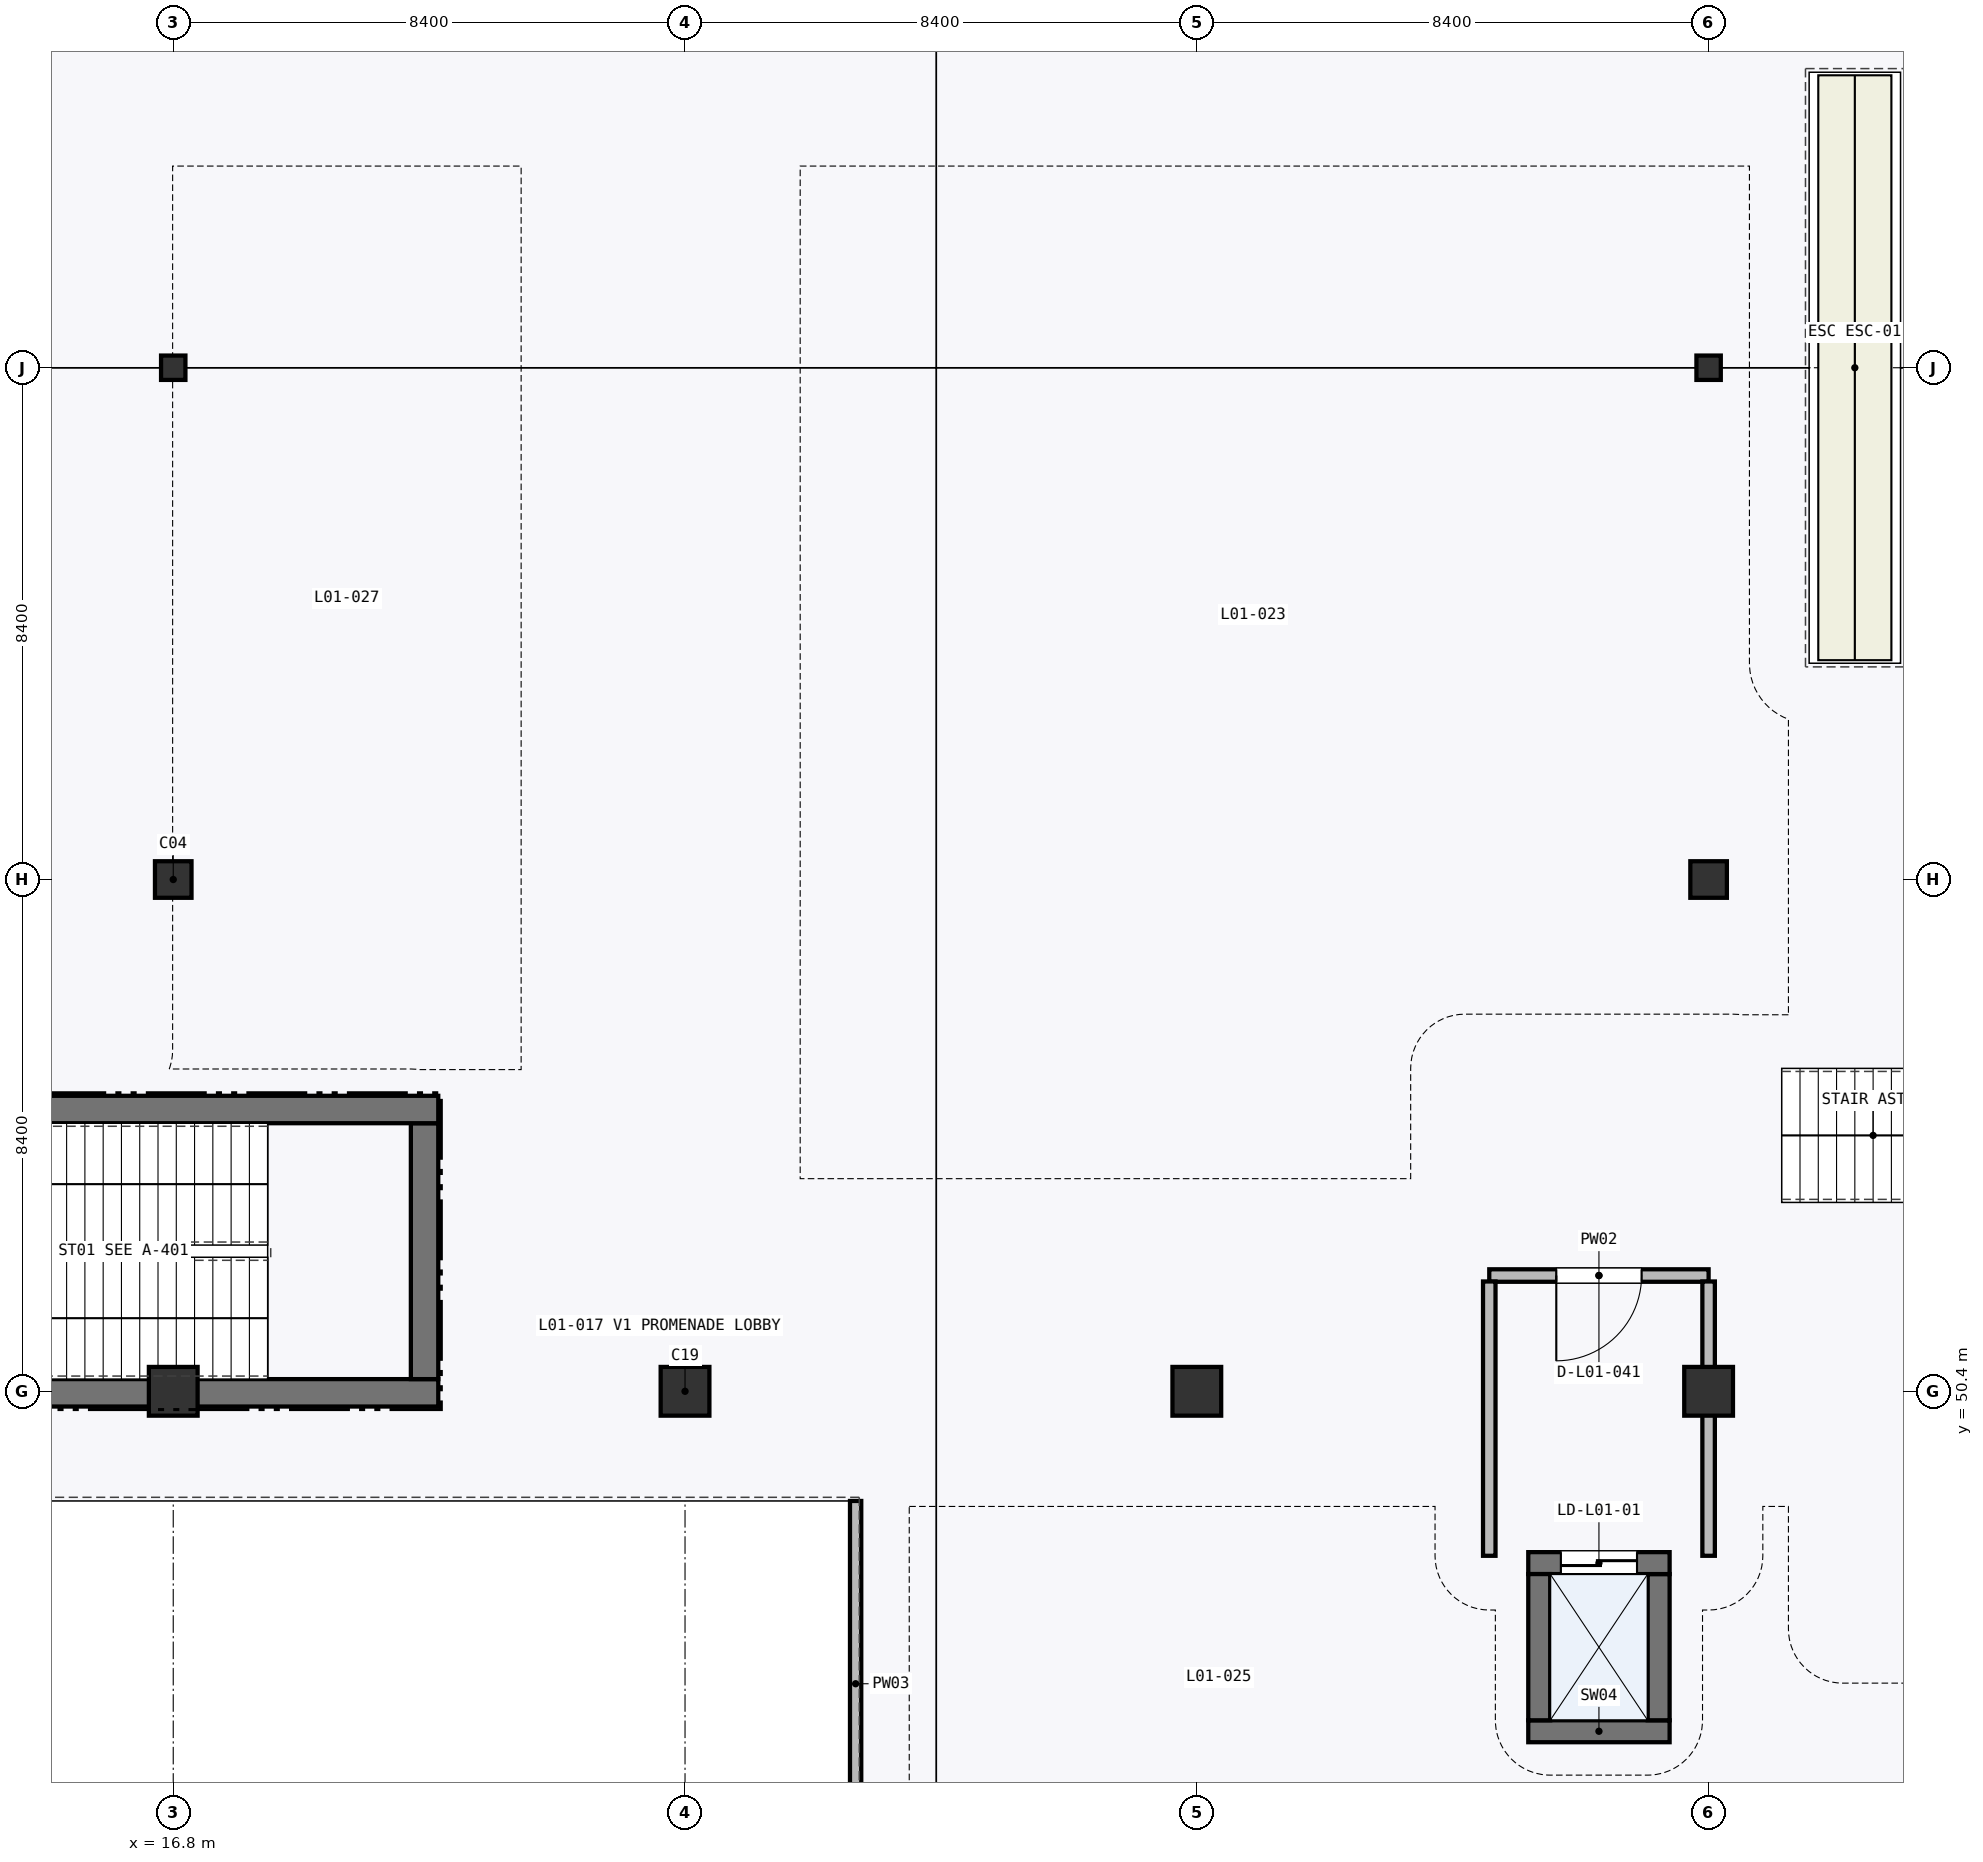
"""IFC4 building model, lengths in metres.
Left out: names, types, materials, properties, quantities, classifications, styles, units other than length and angle.
Written with IfcOpenShell. Run it as: python <this file> out.ifc"""

import sys

from ifc_helpers import new_model, si_unit, direction, frame, frame_2d, origin, origin_2d, place, context, subcontext, project, spatial, rectangle, hollow_rectangle, i_section, extrude, element, fill, save


model = new_model("IFC4")
c1 = context("Model", 3, precision=1e-05, world=origin(), true_north=direction((0.0, 1.0)))
c2 = subcontext(c1, "Body", "Model", "MODEL_VIEW")
j1 = project(units=[si_unit("LENGTHUNIT", "METRE"), si_unit("PLANEANGLEUNIT", "RADIAN")], contexts=[c1])
p1 = place(None, origin())
s1 = spatial("IfcSite", under=j1, at=p1, CompositionType="ELEMENT")
p2 = place(p1, origin())
s2 = spatial("IfcBuilding", under=s1, at=p2, CompositionType="ELEMENT")
p3 = place(p2, origin())
s3 = spatial("IfcBuildingStorey", under=s2, at=p3, CompositionType="ELEMENT", Elevation=0.0)
p4 = place(p3, frame((16.8, 50.4, 0.0), z_axis=(0.0, 0.0, 1.0), x_axis=(1.0, 0.0, 0.0)))
e1 = element("IfcColumn", 1, at=p4, inside=s3, PredefinedType="COLUMN", context=c2, shape_type="SweptSolid", body=[
    extrude(rectangle(XDim=0.8, YDim=0.8, at=origin_2d()), origin(), (0.0, 0.0, 1.0), 6.0),
])
p5 = place(p3, frame((16.8, 58.8, 0.0), z_axis=(0.0, 0.0, 1.0), x_axis=(1.0, 0.0, 0.0)))
e2 = element("IfcColumn", 2, at=p5, inside=s3, PredefinedType="COLUMN", context=c2, shape_type="SweptSolid", body=[
    extrude(hollow_rectangle(XDim=0.6, YDim=0.6, WallThickness=0.024, at=origin_2d()), origin(), (0.0, 0.0, 1.0), 6.0),
])
p6 = place(p3, frame((16.8, 67.2, 0.0), z_axis=(0.0, 0.0, 1.0), x_axis=(1.0, 0.0, 0.0)))
e3 = element("IfcColumn", 3, at=p6, inside=s3, PredefinedType="COLUMN", context=c2, shape_type="SweptSolid", body=[
    extrude(i_section(OverallWidth=0.4, OverallDepth=0.4, WebThickness=0.013, FlangeThickness=0.021, FilletRadius=0.022, at=origin_2d()), origin(), (0.0, 0.0, 1.0), 6.0),
])
for number, where, z_axis, x_axis in (
    (4, (25.2, 50.4, 0.0), (0.0, 0.0, 1.0), (1.0, 0.0, 0.0)),
    (5, (33.6, 50.4, 0.0), (0.0, 0.0, 1.0), (1.0, 0.0, 0.0)),
    (6, (42.0, 50.4, 0.0), (0.0, 0.0, 1.0), (1.0, 0.0, 0.0)),
):
    element("IfcColumn", number, at=place(p3, frame(where, z_axis=z_axis, x_axis=x_axis)), inside=s3, PredefinedType="COLUMN", context=c2, shape_type="SweptSolid", body=[
        extrude(rectangle(XDim=0.8, YDim=0.8, at=origin_2d()), origin(), (0.0, 0.0, 1.0), 6.0),
    ])
p7 = place(p3, frame((42.0, 58.8, 0.0), z_axis=(0.0, 0.0, 1.0), x_axis=(1.0, 0.0, 0.0)))
e7 = element("IfcColumn", 7, at=p7, inside=s3, PredefinedType="COLUMN", context=c2, shape_type="SweptSolid", body=[
    extrude(hollow_rectangle(XDim=0.6, YDim=0.6, WallThickness=0.024, at=origin_2d()), origin(), (0.0, 0.0, 1.0), 6.0),
])
p8 = place(p3, frame((42.0, 67.2, 0.0), z_axis=(0.0, 0.0, 1.0), x_axis=(1.0, 0.0, 0.0)))
e8 = element("IfcColumn", 8, at=p8, inside=s3, PredefinedType="COLUMN", context=c2, shape_type="SweptSolid", body=[
    extrude(i_section(OverallWidth=0.4, OverallDepth=0.4, WebThickness=0.013, FlangeThickness=0.021, FilletRadius=0.022, at=origin_2d()), origin(), (0.0, 0.0, 1.0), 6.0),
])
p9 = place(p3, frame((10.05, 50.375, 0.0), z_axis=(0.0, 0.0, 1.0), x_axis=(1.0, 0.0, 0.0)))
e9 = element("IfcWall", 9, at=p9, inside=s3, PredefinedType="SHEAR", context=c2, shape_type="SweptSolid", body=[
    extrude(rectangle(XDim=11.1, YDim=0.45, at=frame_2d((5.55, 0.0))), origin(), (0.0, 0.0, 1.0), 5.745),
])
p10 = place(p3, frame((20.925, 50.6, 0.0), z_axis=(0.0, 0.0, 1.0), x_axis=(0.0, 1.0, 0.0)))
e10 = element("IfcWall", 10, at=p10, inside=s3, PredefinedType="SHEAR", context=c2, shape_type="SweptSolid", body=[
    extrude(rectangle(XDim=4.2, YDim=0.45, at=frame_2d((2.1, 0.0))), origin(), (0.0, 0.0, 1.0), 5.745),
])
p11 = place(p3, frame((21.15, 55.025, 0.0), z_axis=(0.0, 0.0, 1.0), x_axis=(-1.0, 0.0, 0.0)))
e11 = element("IfcWall", 11, at=p11, inside=s3, PredefinedType="SHEAR", context=c2, shape_type="SweptSolid", body=[
    extrude(rectangle(XDim=11.1, YDim=0.45, at=frame_2d((5.55, 0.0))), origin(), (0.0, 0.0, 1.0), 5.745),
])
p12 = place(p3, frame((39.04, 44.82, 0.0), z_axis=(0.0, 0.0, 1.0), x_axis=(1.0, 0.0, 0.0)))
e12 = element("IfcWall", 12, at=p12, inside=s3, PredefinedType="SHEAR", context=c2, shape_type="SweptSolid", body=[
    extrude(rectangle(XDim=2.32, YDim=0.36, at=frame_2d((1.16, 0.0))), origin(), (0.0, 0.0, 1.0), 5.745),
])
p13 = place(p3, frame((41.18, 45.0, 0.0), z_axis=(0.0, 0.0, 1.0), x_axis=(0.0, 1.0, 0.0)))
e13 = element("IfcWall", 13, at=p13, inside=s3, PredefinedType="SHEAR", context=c2, shape_type="SweptSolid", body=[
    extrude(rectangle(XDim=2.4, YDim=0.36, at=frame_2d((1.2, 0.0))), origin(), (0.0, 0.0, 1.0), 5.745),
])
p14 = place(p3, frame((41.36, 47.58, 0.0), z_axis=(0.0, 0.0, 1.0), x_axis=(-1.0, 0.0, 0.0)))
e14 = element("IfcWall", 14, at=p14, inside=s3, PredefinedType="SHEAR", context=c2, shape_type="SweptSolid", body=[
    extrude(rectangle(XDim=2.32, YDim=0.36, at=frame_2d((1.16, 0.0))), origin(), (0.0, 0.0, 1.0), 5.745),
])
p15 = place(p14, frame((0.535, 0.0, 0.0)))
e15 = element("IfcOpeningElement", 15, at=p15, cuts=e14, PredefinedType="OPENING", context=c2, shape_type="SweptSolid", body=[
    extrude(rectangle(XDim=1.25, YDim=2.2, at=frame_2d((0.625, 1.1))), frame((0.0, 0.19, 0.0), z_axis=(0.0, -1.0, 0.0), x_axis=(1.0, 0.0, 0.0)), (0.0, 0.0, 1.0), 0.38),
])
p16 = place(p3, frame((39.22, 47.4, 0.0), z_axis=(0.0, 0.0, 1.0), x_axis=(0.0, -1.0, 0.0)))
e16 = element("IfcWall", 16, at=p16, inside=s3, PredefinedType="SHEAR", context=c2, shape_type="SweptSolid", body=[
    extrude(rectangle(XDim=2.4, YDim=0.36, at=frame_2d((1.2, 0.0))), origin(), (0.0, 0.0, 1.0), 5.745),
])
p17 = place(p3, frame((42.0, 52.3, 0.0), z_axis=(0.0, 0.0, 1.0), x_axis=(-1.0, 0.0, 0.0)))
e17 = element("IfcWall", 17, at=p17, inside=s3, PredefinedType="PARTITIONING", context=c2, shape_type="SweptSolid", body=[
    extrude(rectangle(XDim=3.6, YDim=0.205, at=frame_2d((1.8, 0.0))), origin(), (0.0, 0.0, 1.0), 5.745),
])
p18 = place(p17, frame((1.1, 0.0, 0.0)))
e18 = element("IfcOpeningElement", 18, at=p18, cuts=e17, PredefinedType="OPENING", context=c2, shape_type="SweptSolid", body=[
    extrude(rectangle(XDim=1.4, YDim=2.15, at=frame_2d((0.7, 1.075))), frame((0.0, 0.113, 0.0), z_axis=(0.0, -1.0, 0.0), x_axis=(1.0, 0.0, 0.0)), (0.0, 0.0, 1.0), 0.225),
])
p19 = place(p3, frame((42.0, 47.7, 0.0), z_axis=(0.0, 0.0, 1.0), x_axis=(0.0, 1.0, 0.0)))
e19 = element("IfcWall", 19, at=p19, inside=s3, PredefinedType="PARTITIONING", context=c2, shape_type="SweptSolid", body=[
    extrude(rectangle(XDim=4.502, YDim=0.205, at=frame_2d((2.251, 0.0))), origin(), (0.0, 0.0, 1.0), 4.945),
])
p20 = place(p3, frame((38.4, 52.202, 0.0), z_axis=(0.0, 0.0, 1.0), x_axis=(0.0, -1.0, 0.0)))
e20 = element("IfcWall", 20, at=p20, inside=s3, PredefinedType="PARTITIONING", context=c2, shape_type="SweptSolid", body=[
    extrude(rectangle(XDim=4.502, YDim=0.205, at=frame_2d((2.251, 0.0))), origin(), (0.0, 0.0, 1.0), 5.745),
])
p21 = place(p3, frame((28.0, 48.6, 0.0), z_axis=(0.0, 0.0, 1.0), x_axis=(0.0, -1.0, 0.0)))
e21 = element("IfcWall", 21, at=p21, inside=s3, PredefinedType="PARTITIONING", context=c2, shape_type="SweptSolid", body=[
    extrude(rectangle(XDim=6.0, YDim=0.185, at=frame_2d((3.0, 0.0))), origin(), (0.0, 0.0, 1.0), 5.337),
])
p22 = place(p15, frame((1.25, 0.0, 0.0), z_axis=(0.0, 0.0, 1.0), x_axis=(-1.0, 0.0, 0.0)))
e22 = element("IfcDoor", 22, at=p22, inside=s3, OperationType="DOUBLE_DOOR_SLIDING", PredefinedType="DOOR", context=c2, shape_type="SweptSolid", body=[
    extrude(rectangle(XDim=1.25, YDim=2.2, at=frame_2d((0.625, 1.1))), frame((0.0, 0.025, 0.0), z_axis=(0.0, -1.0, 0.0), x_axis=(1.0, 0.0, 0.0)), (0.0, 0.0, 1.0), 0.05),
])
fill(e15, e22)
p23 = place(p18, origin())
e23 = element("IfcDoor", 23, at=p23, inside=s3, OperationType="SINGLE_SWING_RIGHT", PredefinedType="DOOR", context=c2, shape_type="SweptSolid", body=[
    extrude(rectangle(XDim=1.4, YDim=2.15, at=frame_2d((0.7, 1.075))), frame((0.0, 0.025, 0.0), z_axis=(0.0, -1.0, 0.0), x_axis=(1.0, 0.0, 0.0)), (0.0, 0.0, 1.0), 0.05),
])
fill(e18, e23)
save(model, sys.argv[1])
